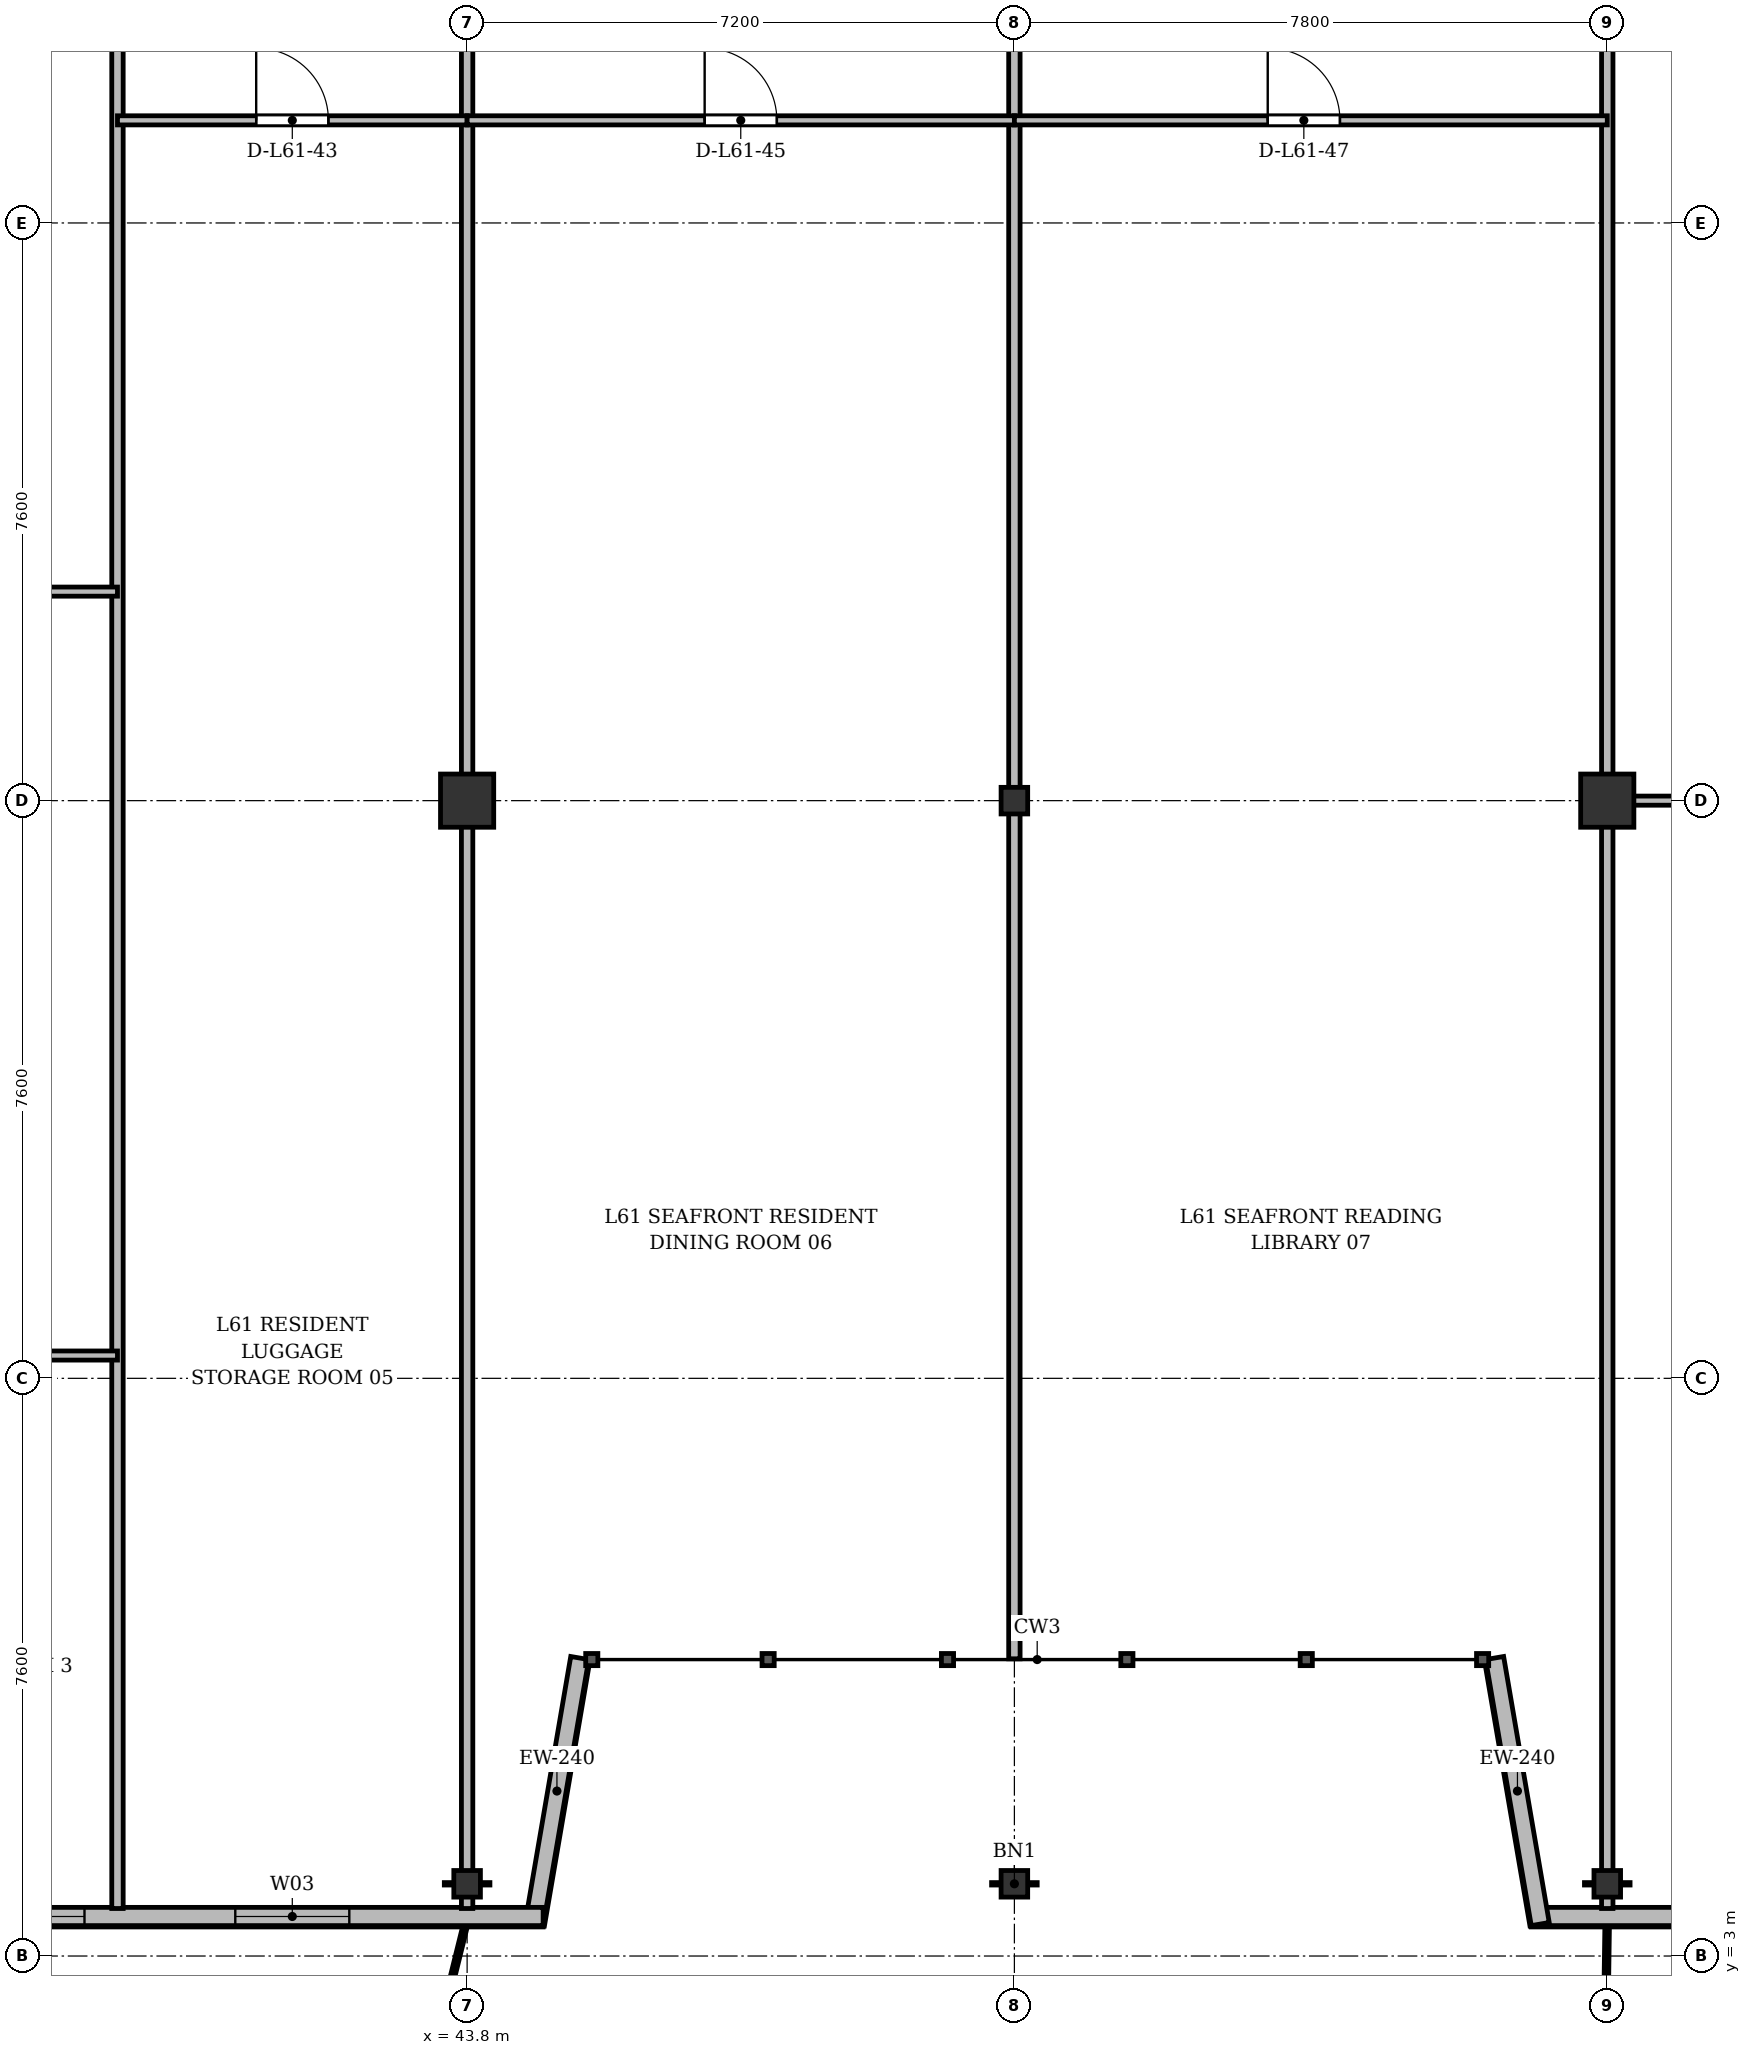
"""IFC4 building model, lengths in metres.
Left out: names, types, materials, properties, quantities, classifications, styles, units other than length and angle.
Written with IfcOpenShell. Run it as: python <this file> out.ifc"""

import sys

from ifc_helpers import new_model, si_unit, direction, frame, frame_2d, origin, origin_2d, place, context, subcontext, project, spatial, rectangle, i_section, extrude, source, transform, mapped, element, fill, save


model = new_model("IFC4")
c1 = context("Model", 3, precision=1e-05, world=origin(), true_north=direction((0.0, 1.0)))
c2 = subcontext(c1, "Body", "Model", "MODEL_VIEW")
j1 = project(units=[si_unit("LENGTHUNIT", "METRE"), si_unit("PLANEANGLEUNIT", "RADIAN")], contexts=[c1])
p1 = place(None, origin())
s1 = spatial("IfcSite", under=j1, at=p1, CompositionType="ELEMENT")
p2 = place(p1, origin())
s2 = spatial("IfcBuilding", under=s1, at=p2, CompositionType="ELEMENT")
p3 = place(p2, frame((0.0, 0.0, 233.7)))
s3 = spatial("IfcBuildingStorey", under=s2, at=p3, CompositionType="ELEMENT", Elevation=233.7)
m1 = source(origin(), c2, "Body", "SweptSolid", [
    extrude(i_section(OverallWidth=0.35, OverallDepth=0.35, WebThickness=0.018, FlangeThickness=0.028, at=origin_2d()), origin(), (0.0, 0.0, 1.0), 3.6),
])
p4 = place(p3, frame((43.8, 3.95, 0.0), z_axis=(0.0, 0.0, 1.0), x_axis=(1.0, 0.0, 0.0)))
e1 = element("IfcColumn", 1, at=p4, inside=s3, PredefinedType="COLUMN", context=c2, shape_type="MappedRepresentation", body=[
    mapped(m1, transform((0.0, 0.0, 0.0), x_axis=(1.0, 0.0, 0.0), y_axis=(0.0, 1.0, 0.0), z_axis=(0.0, 0.0, 1.0), scale=1.0)),
])
m2 = source(origin(), c2, "Body", "SweptSolid", [
    extrude(rectangle(XDim=0.7, YDim=0.7, at=origin_2d()), origin(), (0.0, 0.0, 1.0), 3.6),
])
p5 = place(p3, frame((43.8, 18.2, 0.0), z_axis=(0.0, 0.0, 1.0), x_axis=(1.0, 0.0, 0.0)))
e2 = element("IfcColumn", 2, at=p5, inside=s3, PredefinedType="COLUMN", context=c2, shape_type="MappedRepresentation", body=[
    mapped(m2, transform((0.0, 0.0, 0.0), x_axis=(1.0, 0.0, 0.0), y_axis=(0.0, 1.0, 0.0), z_axis=(0.0, 0.0, 1.0), scale=1.0)),
])
for number, where, z_axis, x_axis in (
    (3, (51.0, 3.95, 0.0), (0.0, 0.0, 1.0), (1.0, 0.0, 0.0)),
    (4, (51.0, 18.2, 0.0), (0.0, 0.0, 1.0), (1.0, 0.0, 0.0)),
    (5, (58.8, 3.95, 0.0), (0.0, 0.0, 1.0), (1.0, 0.0, 0.0)),
):
    element("IfcColumn", number, at=place(p3, frame(where, z_axis=z_axis, x_axis=x_axis)), inside=s3, PredefinedType="COLUMN", context=c2, shape_type="MappedRepresentation", body=[
        mapped(m1, transform((0.0, 0.0, 0.0), x_axis=(1.0, 0.0, 0.0), y_axis=(0.0, 1.0, 0.0), z_axis=(0.0, 0.0, 1.0), scale=1.0)),
    ])
p6 = place(p3, frame((58.8, 18.2, 0.0), z_axis=(0.0, 0.0, 1.0), x_axis=(1.0, 0.0, 0.0)))
e6 = element("IfcColumn", 6, at=p6, inside=s3, PredefinedType="COLUMN", context=c2, shape_type="MappedRepresentation", body=[
    mapped(m2, transform((0.0, 0.0, 0.0), x_axis=(1.0, 0.0, 0.0), y_axis=(0.0, 1.0, 0.0), z_axis=(0.0, 0.0, 1.0), scale=1.0)),
])
p7 = place(p3, frame((63.4, 3.52, 0.0), z_axis=(0.0, 0.0, 1.0), x_axis=(-1.0, 0.0, 0.0)))
e7 = element("IfcWall", 7, at=p7, inside=s3, PredefinedType="SOLIDWALL", context=c2, shape_type="SweptSolid", body=[
    extrude(rectangle(XDim=5.6, YDim=0.24, at=frame_2d((2.8, 0.0))), origin(), (0.0, 0.0, 1.0), 3.36),
])
p8 = place(p7, frame((1.245, 0.0, 0.9)))
e8 = element("IfcOpeningElement", 8, at=p8, cuts=e7, PredefinedType="OPENING", context=c2, shape_type="SweptSolid", body=[
    extrude(rectangle(XDim=2.2, YDim=1.8, at=frame_2d((1.1, 0.9))), frame((0.0, 0.13, 0.0), z_axis=(0.0, -1.0, 0.0), x_axis=(1.0, 0.0, 0.0)), (0.0, 0.0, 1.0), 0.26),
])
for number, where, z_axis, x_axis in (
    (9, (57.918, 3.42, 0.0), (0.0, 0.0, 1.0), (-0.169, 0.986, 0.0)),
    (10, (45.282, 6.92, 0.0), (0.0, 0.0, 1.0), (-0.169, -0.986, 0.0)),
):
    element("IfcWall", number, at=place(p3, frame(where, z_axis=z_axis, x_axis=x_axis)), inside=s3, PredefinedType="SOLIDWALL", context=c2, shape_type="SweptSolid", body=[
        extrude(rectangle(XDim=3.551, YDim=0.24, at=frame_2d((1.775, 0.0))), origin(), (0.0, 0.0, 1.0), 2.91),
    ])
p9 = place(p3, frame((44.8, 3.52, 0.0), z_axis=(0.0, 0.0, 1.0), x_axis=(-1.0, 0.0, 0.0)))
e11 = element("IfcWall", 11, at=p9, inside=s3, PredefinedType="SOLIDWALL", context=c2, shape_type="SweptSolid", body=[
    extrude(rectangle(XDim=33.8, YDim=0.24, at=frame_2d((16.9, 0.0))), origin(), (0.0, 0.0, 1.0), 3.36),
])
p10 = place(p9, frame((2.55, 0.0, 0.9)))
e12 = element("IfcOpeningElement", 12, at=p10, cuts=e11, PredefinedType="OPENING", context=c2, shape_type="SweptSolid", body=[
    extrude(rectangle(XDim=1.5, YDim=1.75, at=frame_2d((0.75, 0.875))), frame((0.0, 0.13, 0.0), z_axis=(0.0, -1.0, 0.0), x_axis=(1.0, 0.0, 0.0)), (0.0, 0.0, 1.0), 0.26),
])
p11 = place(p9, frame((6.034, 0.0, 0.9)))
e13 = element("IfcOpeningElement", 13, at=p11, cuts=e11, PredefinedType="OPENING", context=c2, shape_type="SweptSolid", body=[
    extrude(rectangle(XDim=2.0, YDim=1.95, at=frame_2d((1.0, 0.975))), frame((0.0, 0.13, 0.0), z_axis=(0.0, -1.0, 0.0), x_axis=(1.0, 0.0, 0.0)), (0.0, 0.0, 1.0), 0.26),
])
p12 = place(p9, frame((9.075, 0.0, 0.9)))
e14 = element("IfcOpeningElement", 14, at=p12, cuts=e11, PredefinedType="OPENING", context=c2, shape_type="SweptSolid", body=[
    extrude(rectangle(XDim=1.65, YDim=1.85, at=frame_2d((0.825, 0.925))), frame((0.0, 0.13, 0.0), z_axis=(0.0, -1.0, 0.0), x_axis=(1.0, 0.0, 0.0)), (0.0, 0.0, 1.0), 0.26),
])
p13 = place(p9, frame((11.867, 0.0, 0.9)))
e15 = element("IfcOpeningElement", 15, at=p13, cuts=e11, PredefinedType="OPENING", context=c2, shape_type="SweptSolid", body=[
    extrude(rectangle(XDim=1.8, YDim=1.8, at=frame_2d((0.9, 0.9))), frame((0.0, 0.13, 0.0), z_axis=(0.0, -1.0, 0.0), x_axis=(1.0, 0.0, 0.0)), (0.0, 0.0, 1.0), 0.26),
])
p14 = place(p9, frame((17.291, 0.0, 0.0)))
e16 = element("IfcOpeningElement", 16, at=p14, cuts=e11, PredefinedType="OPENING", context=c2, shape_type="SweptSolid", body=[
    extrude(rectangle(XDim=1.2, YDim=2.2, at=frame_2d((0.6, 1.1))), frame((0.0, 0.13, 0.0), z_axis=(0.0, -1.0, 0.0), x_axis=(1.0, 0.0, 0.0)), (0.0, 0.0, 1.0), 0.26),
])
p15 = place(p9, frame((22.6, 0.0, 0.9)))
e17 = element("IfcOpeningElement", 17, at=p15, cuts=e11, PredefinedType="OPENING", context=c2, shape_type="SweptSolid", body=[
    extrude(rectangle(XDim=1.5, YDim=1.75, at=frame_2d((0.75, 0.875))), frame((0.0, 0.13, 0.0), z_axis=(0.0, -1.0, 0.0), x_axis=(1.0, 0.0, 0.0)), (0.0, 0.0, 1.0), 0.26),
])
p16 = place(p9, frame((26.25, 0.0, 0.9)))
e18 = element("IfcOpeningElement", 18, at=p16, cuts=e11, PredefinedType="OPENING", context=c2, shape_type="SweptSolid", body=[
    extrude(rectangle(XDim=2.0, YDim=1.95, at=frame_2d((1.0, 0.975))), frame((0.0, 0.13, 0.0), z_axis=(0.0, -1.0, 0.0), x_axis=(1.0, 0.0, 0.0)), (0.0, 0.0, 1.0), 0.26),
])
p17 = place(p9, frame((30.63, 0.0, 0.9)))
e19 = element("IfcOpeningElement", 19, at=p17, cuts=e11, PredefinedType="OPENING", context=c2, shape_type="SweptSolid", body=[
    extrude(rectangle(XDim=1.65, YDim=1.85, at=frame_2d((0.825, 0.925))), frame((0.0, 0.13, 0.0), z_axis=(0.0, -1.0, 0.0), x_axis=(1.0, 0.0, 0.0)), (0.0, 0.0, 1.0), 0.26),
])
p18 = place(p3, frame((39.2, 3.625, 0.0), z_axis=(0.0, 0.0, 1.0), x_axis=(0.0, 1.0, 0.0)))
e20 = element("IfcWall", 20, at=p18, inside=s3, PredefinedType="PARTITIONING", context=c2, shape_type="SweptSolid", body=[
    extrude(rectangle(XDim=27.375, YDim=0.15, at=frame_2d((13.688, 0.0))), origin(), (0.0, 0.0, 1.0), 2.91),
])
p19 = place(p3, frame((43.8, 3.625, 0.0), z_axis=(0.0, 0.0, 1.0), x_axis=(0.0, 1.0, 0.0)))
e21 = element("IfcWall", 21, at=p19, inside=s3, PredefinedType="PARTITIONING", context=c2, shape_type="SweptSolid", body=[
    extrude(rectangle(XDim=27.375, YDim=0.15, at=frame_2d((13.688, 0.0))), origin(), (0.0, 0.0, 1.0), 2.86),
])
p20 = place(p3, frame((51.0, 6.91, 0.0), z_axis=(0.0, 0.0, 1.0), x_axis=(0.0, 1.0, 0.0)))
e22 = element("IfcWall", 22, at=p20, inside=s3, PredefinedType="PARTITIONING", context=c2, shape_type="SweptSolid", body=[
    extrude(rectangle(XDim=24.09, YDim=0.15, at=frame_2d((12.045, 0.0))), origin(), (0.0, 0.0, 1.0), 2.86),
])
p21 = place(p3, frame((58.8, 3.625, 0.0), z_axis=(0.0, 0.0, 1.0), x_axis=(0.0, 1.0, 0.0)))
e23 = element("IfcWall", 23, at=p21, inside=s3, PredefinedType="PARTITIONING", context=c2, shape_type="SweptSolid", body=[
    extrude(rectangle(XDim=27.375, YDim=0.15, at=frame_2d((13.688, 0.0))), origin(), (0.0, 0.0, 1.0), 2.86),
])
p22 = place(p3, frame((30.6, 20.95, 0.0), z_axis=(0.0, 0.0, 1.0), x_axis=(1.0, 0.0, 0.0)))
e24 = element("IfcWall", 24, at=p22, inside=s3, PredefinedType="PARTITIONING", context=c2, shape_type="SweptSolid", body=[
    extrude(rectangle(XDim=8.6, YDim=0.12, at=frame_2d((4.3, 0.0))), origin(), (0.0, 0.0, 1.0), 2.86),
])
p23 = place(p22, frame((3.825, 0.0, 0.0)))
e25 = element("IfcOpeningElement", 25, at=p23, cuts=e24, PredefinedType="OPENING", context=c2, shape_type="SweptSolid", body=[
    extrude(rectangle(XDim=0.95, YDim=2.15, at=frame_2d((0.475, 1.075))), frame((0.0, 0.07, 0.0), z_axis=(0.0, -1.0, 0.0), x_axis=(1.0, 0.0, 0.0)), (0.0, 0.0, 1.0), 0.14),
])
p24 = place(p3, frame((36.333, 10.9, 0.0), z_axis=(0.0, 0.0, 1.0), x_axis=(1.0, 0.0, 0.0)))
e26 = element("IfcWall", 26, at=p24, inside=s3, PredefinedType="PARTITIONING", context=c2, shape_type="SweptSolid", body=[
    extrude(rectangle(XDim=2.867, YDim=0.12, at=frame_2d((1.434, 0.0))), origin(), (0.0, 0.0, 1.0), 3.36),
])
p25 = place(p24, frame((0.959, 0.0, 0.0)))
e27 = element("IfcOpeningElement", 27, at=p25, cuts=e26, PredefinedType="OPENING", context=c2, shape_type="SweptSolid", body=[
    extrude(rectangle(XDim=0.95, YDim=2.15, at=frame_2d((0.475, 1.075))), frame((0.0, 0.07, 0.0), z_axis=(0.0, -1.0, 0.0), x_axis=(1.0, 0.0, 0.0)), (0.0, 0.0, 1.0), 0.14),
])
p26 = place(p3, frame((39.2, 27.15, 0.0), z_axis=(0.0, 0.0, 1.0), x_axis=(1.0, 0.0, 0.0)))
e28 = element("IfcWall", 28, at=p26, inside=s3, PredefinedType="PARTITIONING", context=c2, shape_type="SweptSolid", body=[
    extrude(rectangle(XDim=4.6, YDim=0.12, at=frame_2d((2.3, 0.0))), origin(), (0.0, 0.0, 1.0), 2.86),
])
p27 = place(p26, frame((1.825, 0.0, 0.0)))
e29 = element("IfcOpeningElement", 29, at=p27, cuts=e28, PredefinedType="OPENING", context=c2, shape_type="SweptSolid", body=[
    extrude(rectangle(XDim=0.95, YDim=2.15, at=frame_2d((0.475, 1.075))), frame((0.0, 0.07, 0.0), z_axis=(0.0, -1.0, 0.0), x_axis=(1.0, 0.0, 0.0)), (0.0, 0.0, 1.0), 0.14),
])
p28 = place(p3, frame((43.8, 27.15, 0.0), z_axis=(0.0, 0.0, 1.0), x_axis=(1.0, 0.0, 0.0)))
e30 = element("IfcWall", 30, at=p28, inside=s3, PredefinedType="PARTITIONING", context=c2, shape_type="SweptSolid", body=[
    extrude(rectangle(XDim=7.2, YDim=0.12, at=frame_2d((3.6, 0.0))), origin(), (0.0, 0.0, 1.0), 2.86),
])
p29 = place(p28, frame((3.125, 0.0, 0.0)))
e31 = element("IfcOpeningElement", 31, at=p29, cuts=e30, PredefinedType="OPENING", context=c2, shape_type="SweptSolid", body=[
    extrude(rectangle(XDim=0.95, YDim=2.15, at=frame_2d((0.475, 1.075))), frame((0.0, 0.07, 0.0), z_axis=(0.0, -1.0, 0.0), x_axis=(1.0, 0.0, 0.0)), (0.0, 0.0, 1.0), 0.14),
])
p30 = place(p3, frame((51.0, 27.15, 0.0), z_axis=(0.0, 0.0, 1.0), x_axis=(1.0, 0.0, 0.0)))
e32 = element("IfcWall", 32, at=p30, inside=s3, PredefinedType="PARTITIONING", context=c2, shape_type="SweptSolid", body=[
    extrude(rectangle(XDim=7.8, YDim=0.12, at=frame_2d((3.9, 0.0))), origin(), (0.0, 0.0, 1.0), 2.86),
])
p31 = place(p30, frame((3.333, 0.0, 0.0)))
e33 = element("IfcOpeningElement", 33, at=p31, cuts=e32, PredefinedType="OPENING", context=c2, shape_type="SweptSolid", body=[
    extrude(rectangle(XDim=0.95, YDim=2.15, at=frame_2d((0.475, 1.075))), frame((0.0, 0.07, 0.0), z_axis=(0.0, -1.0, 0.0), x_axis=(1.0, 0.0, 0.0)), (0.0, 0.0, 1.0), 0.14),
])
p32 = place(p3, frame((58.8, 18.2, 0.0), z_axis=(0.0, 0.0, 1.0), x_axis=(1.0, 0.0, 0.0)))
e34 = element("IfcWall", 34, at=p32, inside=s3, PredefinedType="PARTITIONING", context=c2, shape_type="SweptSolid", body=[
    extrude(rectangle(XDim=7.375, YDim=0.12, at=frame_2d((3.688, 0.0))), origin(), (0.0, 0.0, 1.0), 2.91),
])
p33 = place(p32, frame((3.304, 0.0, 0.0)))
e35 = element("IfcOpeningElement", 35, at=p33, cuts=e34, PredefinedType="OPENING", context=c2, shape_type="SweptSolid", body=[
    extrude(rectangle(XDim=0.95, YDim=2.15, at=frame_2d((0.475, 1.075))), frame((0.0, 0.07, 0.0), z_axis=(0.0, -1.0, 0.0), x_axis=(1.0, 0.0, 0.0)), (0.0, 0.0, 1.0), 0.14),
])
m3 = source(origin(), c2, "Body", "SweptSolid", [
    extrude(rectangle(XDim=1.5, YDim=1.75, at=frame_2d((0.75, 0.875))), frame((0.0, 0.03, 0.0), z_axis=(0.0, -1.0, 0.0), x_axis=(1.0, 0.0, 0.0)), (0.0, 0.0, 1.0), 0.06),
])
p34 = place(p10, origin())
e36 = element("IfcWindow", 36, at=p34, inside=s3, PartitioningType="SINGLE_PANEL", PredefinedType="WINDOW", context=c2, shape_type="MappedRepresentation", body=[
    mapped(m3, transform((0.0, 0.0, 0.0), x_axis=(1.0, 0.0, 0.0), y_axis=(0.0, 1.0, 0.0), z_axis=(0.0, 0.0, 1.0), scale=1.0)),
])
fill(e12, e36)
m4 = source(origin(), c2, "Body", "SweptSolid", [
    extrude(rectangle(XDim=2.0, YDim=1.95, at=frame_2d((1.0, 0.975))), frame((0.0, 0.03, 0.0), z_axis=(0.0, -1.0, 0.0), x_axis=(1.0, 0.0, 0.0)), (0.0, 0.0, 1.0), 0.06),
])
p35 = place(p11, origin())
e37 = element("IfcWindow", 37, at=p35, inside=s3, PartitioningType="SINGLE_PANEL", PredefinedType="WINDOW", context=c2, shape_type="MappedRepresentation", body=[
    mapped(m4, transform((0.0, 0.0, 0.0), x_axis=(1.0, 0.0, 0.0), y_axis=(0.0, 1.0, 0.0), z_axis=(0.0, 0.0, 1.0), scale=1.0)),
])
fill(e13, e37)
m5 = source(origin(), c2, "Body", "SweptSolid", [
    extrude(rectangle(XDim=0.95, YDim=2.15, at=frame_2d((0.475, 1.075))), frame((0.0, 0.025, 0.0), z_axis=(0.0, -1.0, 0.0), x_axis=(1.0, 0.0, 0.0)), (0.0, 0.0, 1.0), 0.05),
])
p36 = place(p27, origin())
e38 = element("IfcDoor", 38, at=p36, inside=s3, OperationType="SINGLE_SWING_LEFT", PredefinedType="DOOR", context=c2, shape_type="MappedRepresentation", body=[
    mapped(m5, transform((0.0, 0.0, 0.0), x_axis=(1.0, 0.0, 0.0), y_axis=(0.0, 1.0, 0.0), z_axis=(0.0, 0.0, 1.0), scale=1.0)),
])
fill(e29, e38)
p37 = place(p29, origin())
e39 = element("IfcDoor", 39, at=p37, inside=s3, OperationType="SINGLE_SWING_LEFT", PredefinedType="DOOR", context=c2, shape_type="MappedRepresentation", body=[
    mapped(m5, transform((0.0, 0.0, 0.0), x_axis=(1.0, 0.0, 0.0), y_axis=(0.0, 1.0, 0.0), z_axis=(0.0, 0.0, 1.0), scale=1.0)),
])
fill(e31, e39)
p38 = place(p31, origin())
e40 = element("IfcDoor", 40, at=p38, inside=s3, OperationType="SINGLE_SWING_LEFT", PredefinedType="DOOR", context=c2, shape_type="MappedRepresentation", body=[
    mapped(m5, transform((0.0, 0.0, 0.0), x_axis=(1.0, 0.0, 0.0), y_axis=(0.0, 1.0, 0.0), z_axis=(0.0, 0.0, 1.0), scale=1.0)),
])
fill(e33, e40)
save(model, sys.argv[1])
